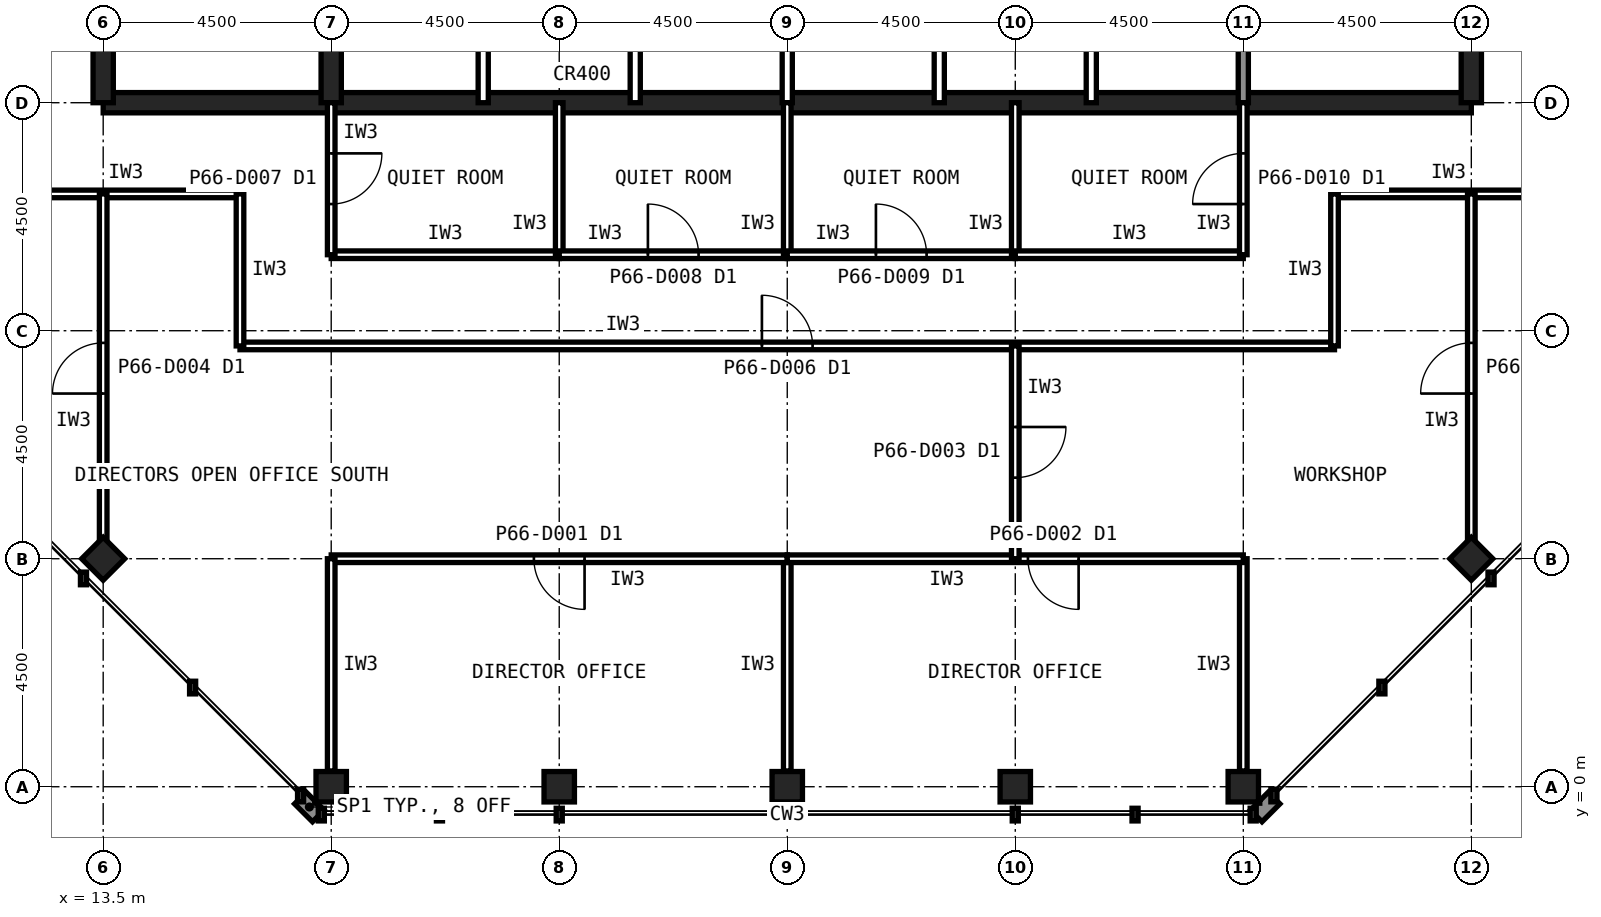
"""IFC4 building model, lengths in metres.
Left out: names, types, materials, properties, quantities, classifications, styles, units other than length and angle.
Written with IfcOpenShell. Run it as: python <this file> out.ifc"""

import sys

from ifc_helpers import new_model, si_unit, direction, frame, frame_2d, origin, origin_2d, place, context, subcontext, project, spatial, rectangle, hollow_rectangle, extrude, element, fill, save


model = new_model("IFC4")
c1 = context("Model", 3, precision=1e-05, world=origin(), true_north=direction((0.0, 1.0)))
c2 = subcontext(c1, "Body", "Model", "MODEL_VIEW")
j1 = project(units=[si_unit("LENGTHUNIT", "METRE"), si_unit("PLANEANGLEUNIT", "RADIAN")], contexts=[c1])
p1 = place(None, origin())
s1 = spatial("IfcSite", under=j1, at=p1, CompositionType="ELEMENT")
p2 = place(p1, origin())
s2 = spatial("IfcBuilding", under=s1, at=p2, CompositionType="ELEMENT")
p3 = place(p2, frame((0.0, 0.0, 278.6)))
s3 = spatial("IfcBuildingStorey", under=s2, at=p3, CompositionType="ELEMENT", Elevation=278.6)
for number, where, z_axis, x_axis in (
    (1, (18.0, 0.0, 0.0), (0.0, 0.0, 1.0), (1.0, 0.0, 0.0)),
    (2, (22.5, 0.0, 0.0), (0.0, 0.0, 1.0), (1.0, 0.0, 0.0)),
    (3, (27.0, 0.0, 0.0), (0.0, 0.0, 1.0), (1.0, 0.0, 0.0)),
    (4, (31.5, 0.0, 0.0), (0.0, 0.0, 1.0), (1.0, 0.0, 0.0)),
    (5, (36.0, 0.0, 0.0), (0.0, 0.0, 1.0), (1.0, 0.0, 0.0)),
    (6, (13.5, 4.5, 0.0), (0.0, 0.0, 1.0), (0.707, 0.707, 0.0)),
    (7, (40.5, 4.5, 0.0), (0.0, 0.0, 1.0), (0.707, 0.707, 0.0)),
):
    element("IfcColumn", number, at=place(p3, frame(where, z_axis=z_axis, x_axis=x_axis)), inside=s3, PredefinedType="COLUMN", context=c2, shape_type="SweptSolid", body=[
        extrude(hollow_rectangle(XDim=0.6, YDim=0.6, WallThickness=0.028, at=origin_2d()), origin(), (0.0, 0.0, 1.0), 4.0),
    ])
p4 = place(p3, frame((13.5, 13.5, 0.0), z_axis=(0.0, 0.0, 1.0), x_axis=(1.0, 0.0, 0.0)))
e8 = element("IfcWall", 8, at=p4, inside=s3, PredefinedType="SHEAR", context=c2, shape_type="SweptSolid", body=[
    extrude(rectangle(XDim=27.0, YDim=0.4, at=frame_2d((13.5, 0.0))), origin(), (0.0, 0.0, 1.0), 4.0),
])
p5 = place(p3, frame((40.5, 13.5, 0.0), z_axis=(0.0, 0.0, 1.0), x_axis=(0.0, 1.0, 0.0)))
e9 = element("IfcWall", 9, at=p5, inside=s3, PredefinedType="SHEAR", context=c2, shape_type="SweptSolid", body=[
    extrude(rectangle(XDim=27.0, YDim=0.4, at=frame_2d((13.5, 0.0))), origin(), (0.0, 0.0, 1.0), 4.0),
])
p6 = place(p5, frame((5.85, 0.0, 0.0)))
e10 = element("IfcOpeningElement", 10, at=p6, cuts=e9, PredefinedType="OPENING", context=c2, shape_type="SweptSolid", body=[
    extrude(rectangle(XDim=1.8, YDim=2.1, at=frame_2d((0.9, 1.05))), frame((0.0, 0.21, 0.0), z_axis=(0.0, -1.0, 0.0), x_axis=(1.0, 0.0, 0.0)), (0.0, 0.0, 1.0), 0.42),
])
p7 = place(p5, frame((19.65, 0.0, 0.0)))
e11 = element("IfcOpeningElement", 11, at=p7, cuts=e9, PredefinedType="OPENING", context=c2, shape_type="SweptSolid", body=[
    extrude(rectangle(XDim=1.2, YDim=2.1, at=frame_2d((0.6, 1.05))), frame((0.0, 0.21, 0.0), z_axis=(0.0, -1.0, 0.0), x_axis=(1.0, 0.0, 0.0)), (0.0, 0.0, 1.0), 0.42),
])
p8 = place(p3, frame((13.5, 40.5, 0.0), z_axis=(0.0, 0.0, 1.0), x_axis=(0.0, -1.0, 0.0)))
e12 = element("IfcWall", 12, at=p8, inside=s3, PredefinedType="SHEAR", context=c2, shape_type="SweptSolid", body=[
    extrude(rectangle(XDim=27.0, YDim=0.4, at=frame_2d((13.5, 0.0))), origin(), (0.0, 0.0, 1.0), 4.0),
])
p9 = place(p8, frame((19.65, 0.0, 0.0)))
e13 = element("IfcOpeningElement", 13, at=p9, cuts=e12, PredefinedType="OPENING", context=c2, shape_type="SweptSolid", body=[
    extrude(rectangle(XDim=1.2, YDim=2.1, at=frame_2d((0.6, 1.05))), frame((0.0, 0.21, 0.0), z_axis=(0.0, -1.0, 0.0), x_axis=(1.0, 0.0, 0.0)), (0.0, 0.0, 1.0), 0.42),
])
p10 = place(p8, frame((5.85, 0.0, 0.0)))
e14 = element("IfcOpeningElement", 14, at=p10, cuts=e12, PredefinedType="OPENING", context=c2, shape_type="SweptSolid", body=[
    extrude(rectangle(XDim=1.8, YDim=2.1, at=frame_2d((0.9, 1.05))), frame((0.0, 0.21, 0.0), z_axis=(0.0, -1.0, 0.0), x_axis=(1.0, 0.0, 0.0)), (0.0, 0.0, 1.0), 0.42),
])
p11 = place(p3, frame((18.0, 13.5, 0.0), z_axis=(0.0, 0.0, 1.0), x_axis=(0.0, 1.0, 0.0)))
e15 = element("IfcWall", 15, at=p11, inside=s3, PredefinedType="SHEAR", context=c2, shape_type="SweptSolid", body=[
    extrude(rectangle(XDim=18.0, YDim=0.4, at=frame_2d((9.0, 0.0))), origin(), (0.0, 0.0, 1.0), 4.0),
])
p12 = place(p3, frame((36.0, 13.5, 0.0), z_axis=(0.0, 0.0, 1.0), x_axis=(0.0, 1.0, 0.0)))
e16 = element("IfcWall", 16, at=p12, inside=s3, PredefinedType="SOLIDWALL", context=c2, shape_type="SweptSolid", body=[
    extrude(rectangle(XDim=4.5, YDim=0.2, at=frame_2d((2.25, 0.0))), origin(), (0.0, 0.0, 1.0), 3.84),
])
for number, where, z_axis, x_axis in (
    (17, (21.0, 13.5, 0.0), (0.0, 0.0, 1.0), (0.0, 1.0, 0.0)),
    (18, (24.0, 13.5, 0.0), (0.0, 0.0, 1.0), (0.0, 1.0, 0.0)),
    (19, (27.0, 13.5, 0.0), (0.0, 0.0, 1.0), (0.0, 1.0, 0.0)),
    (20, (30.0, 13.5, 0.0), (0.0, 0.0, 1.0), (0.0, 1.0, 0.0)),
    (21, (33.0, 13.5, 0.0), (0.0, 0.0, 1.0), (0.0, 1.0, 0.0)),
):
    element("IfcWall", number, at=place(p3, frame(where, z_axis=z_axis, x_axis=x_axis)), inside=s3, PredefinedType="PARTITIONING", context=c2, shape_type="SweptSolid", body=[
        extrude(rectangle(XDim=4.5, YDim=0.2, at=frame_2d((2.25, 0.0))), origin(), (0.0, 0.0, 1.0), 3.84),
    ])
p13 = place(p3, frame((16.2, 8.7, 0.0), z_axis=(0.0, 0.0, 1.0), x_axis=(1.0, 0.0, 0.0)))
e22 = element("IfcWall", 22, at=p13, inside=s3, PredefinedType="PARTITIONING", context=c2, shape_type="SweptSolid", body=[
    extrude(rectangle(XDim=21.6, YDim=0.15, at=frame_2d((10.8, 0.0))), origin(), (0.0, 0.0, 1.0), 3.84),
])
p14 = place(p13, frame((10.3, 0.0, 0.0)))
e23 = element("IfcOpeningElement", 23, at=p14, cuts=e22, PredefinedType="OPENING", context=c2, shape_type="SweptSolid", body=[
    extrude(rectangle(XDim=1.0, YDim=2.1, at=frame_2d((0.5, 1.05))), frame((0.0, 0.085, 0.0), z_axis=(0.0, -1.0, 0.0), x_axis=(1.0, 0.0, 0.0)), (0.0, 0.0, 1.0), 0.17),
])
for number, where, z_axis, x_axis in (
    (24, (11.7, 11.7, 0.0), (0.0, 0.0, 1.0), (1.0, 0.0, 0.0)),
    (25, (37.8, 11.7, 0.0), (0.0, 0.0, 1.0), (1.0, 0.0, 0.0)),
):
    element("IfcWall", number, at=place(p3, frame(where, z_axis=z_axis, x_axis=x_axis)), inside=s3, PredefinedType="PARTITIONING", context=c2, shape_type="SweptSolid", body=[
        extrude(rectangle(XDim=4.5, YDim=0.15, at=frame_2d((2.25, 0.0))), origin(), (0.0, 0.0, 1.0), 3.84),
    ])
for number, where, z_axis, x_axis in (
    (26, (16.2, 11.7, 0.0), (0.0, 0.0, 1.0), (0.0, -1.0, 0.0)),
    (27, (37.8, 8.7, 0.0), (0.0, 0.0, 1.0), (0.0, 1.0, 0.0)),
):
    element("IfcWall", number, at=place(p3, frame(where, z_axis=z_axis, x_axis=x_axis)), inside=s3, PredefinedType="PARTITIONING", context=c2, shape_type="SweptSolid", body=[
        extrude(rectangle(XDim=3.0, YDim=0.15, at=frame_2d((1.5, 0.0))), origin(), (0.0, 0.0, 1.0), 3.84),
    ])
p15 = place(p3, frame((27.0, 0.31, 0.0), z_axis=(0.0, 0.0, 1.0), x_axis=(0.0, 1.0, 0.0)))
e28 = element("IfcWall", 28, at=p15, inside=s3, PredefinedType="PARTITIONING", context=c2, shape_type="SweptSolid", body=[
    extrude(rectangle(XDim=4.19, YDim=0.15, at=frame_2d((2.095, 0.0))), origin(), (0.0, 0.0, 1.0), 2.989),
])
p16 = place(p3, frame((27.0, 4.5, 0.0), z_axis=(0.0, 0.0, 1.0), x_axis=(-1.0, 0.0, 0.0)))
e29 = element("IfcWall", 29, at=p16, inside=s3, PredefinedType="PARTITIONING", context=c2, shape_type="SweptSolid", body=[
    extrude(rectangle(XDim=9.0, YDim=0.15, at=frame_2d((4.5, 0.0))), origin(), (0.0, 0.0, 1.0), 3.84),
])
p17 = place(p16, frame((4.0, 0.0, 0.0)))
e30 = element("IfcOpeningElement", 30, at=p17, cuts=e29, PredefinedType="OPENING", context=c2, shape_type="SweptSolid", body=[
    extrude(rectangle(XDim=1.0, YDim=2.1, at=frame_2d((0.5, 1.05))), frame((0.0, 0.085, 0.0), z_axis=(0.0, -1.0, 0.0), x_axis=(1.0, 0.0, 0.0)), (0.0, 0.0, 1.0), 0.17),
])
for number, where, z_axis, x_axis in (
    (31, (18.0, 4.5, 0.0), (0.0, 0.0, 1.0), (0.0, -1.0, 0.0)),
    (32, (36.0, 0.31, 0.0), (0.0, 0.0, 1.0), (0.0, 1.0, 0.0)),
):
    element("IfcWall", number, at=place(p3, frame(where, z_axis=z_axis, x_axis=x_axis)), inside=s3, PredefinedType="PARTITIONING", context=c2, shape_type="SweptSolid", body=[
        extrude(rectangle(XDim=4.19, YDim=0.15, at=frame_2d((2.095, 0.0))), origin(), (0.0, 0.0, 1.0), 2.989),
    ])
p18 = place(p3, frame((36.0, 4.5, 0.0), z_axis=(0.0, 0.0, 1.0), x_axis=(-1.0, 0.0, 0.0)))
e33 = element("IfcWall", 33, at=p18, inside=s3, PredefinedType="PARTITIONING", context=c2, shape_type="SweptSolid", body=[
    extrude(rectangle(XDim=9.0, YDim=0.15, at=frame_2d((4.5, 0.0))), origin(), (0.0, 0.0, 1.0), 3.84),
])
p19 = place(p18, frame((3.25, 0.0, 0.0)))
e34 = element("IfcOpeningElement", 34, at=p19, cuts=e33, PredefinedType="OPENING", context=c2, shape_type="SweptSolid", body=[
    extrude(rectangle(XDim=1.0, YDim=2.1, at=frame_2d((0.5, 1.05))), frame((0.0, 0.085, 0.0), z_axis=(0.0, -1.0, 0.0), x_axis=(1.0, 0.0, 0.0)), (0.0, 0.0, 1.0), 0.17),
])
p20 = place(p3, frame((18.0, 10.5, 0.0), z_axis=(0.0, 0.0, 1.0), x_axis=(1.0, 0.0, 0.0)))
e35 = element("IfcWall", 35, at=p20, inside=s3, PredefinedType="PARTITIONING", context=c2, shape_type="SweptSolid", body=[
    extrude(rectangle(XDim=4.5, YDim=0.15, at=frame_2d((2.25, 0.0))), origin(), (0.0, 0.0, 1.0), 3.84),
])
p21 = place(p3, frame((22.5, 10.5, 0.0), z_axis=(0.0, 0.0, 1.0), x_axis=(0.0, 1.0, 0.0)))
e36 = element("IfcWall", 36, at=p21, inside=s3, PredefinedType="PARTITIONING", context=c2, shape_type="SweptSolid", body=[
    extrude(rectangle(XDim=3.0, YDim=0.15, at=frame_2d((1.5, 0.0))), origin(), (0.0, 0.0, 1.0), 2.989),
])
p22 = place(p3, frame((18.0, 13.5, 0.0), z_axis=(0.0, 0.0, 1.0), x_axis=(0.0, -1.0, 0.0)))
e37 = element("IfcWall", 37, at=p22, inside=s3, PredefinedType="PARTITIONING", context=c2, shape_type="SweptSolid", body=[
    extrude(rectangle(XDim=3.0, YDim=0.15, at=frame_2d((1.5, 0.0))), origin(), (0.0, 0.0, 1.0), 2.989),
])
p23 = place(p22, frame((1.0, 0.0, 0.0)))
e38 = element("IfcOpeningElement", 38, at=p23, cuts=e37, PredefinedType="OPENING", context=c2, shape_type="SweptSolid", body=[
    extrude(rectangle(XDim=1.0, YDim=2.1, at=frame_2d((0.5, 1.05))), frame((0.0, 0.085, 0.0), z_axis=(0.0, -1.0, 0.0), x_axis=(1.0, 0.0, 0.0)), (0.0, 0.0, 1.0), 0.17),
])
p24 = place(p3, frame((22.5, 10.5, 0.0), z_axis=(0.0, 0.0, 1.0), x_axis=(1.0, 0.0, 0.0)))
e39 = element("IfcWall", 39, at=p24, inside=s3, PredefinedType="PARTITIONING", context=c2, shape_type="SweptSolid", body=[
    extrude(rectangle(XDim=4.5, YDim=0.15, at=frame_2d((2.25, 0.0))), origin(), (0.0, 0.0, 1.0), 3.84),
])
p25 = place(p24, frame((1.75, 0.0, 0.0)))
e40 = element("IfcOpeningElement", 40, at=p25, cuts=e39, PredefinedType="OPENING", context=c2, shape_type="SweptSolid", body=[
    extrude(rectangle(XDim=1.0, YDim=2.1, at=frame_2d((0.5, 1.05))), frame((0.0, 0.085, 0.0), z_axis=(0.0, -1.0, 0.0), x_axis=(1.0, 0.0, 0.0)), (0.0, 0.0, 1.0), 0.17),
])
p26 = place(p3, frame((27.0, 10.5, 0.0), z_axis=(0.0, 0.0, 1.0), x_axis=(0.0, 1.0, 0.0)))
e41 = element("IfcWall", 41, at=p26, inside=s3, PredefinedType="PARTITIONING", context=c2, shape_type="SweptSolid", body=[
    extrude(rectangle(XDim=3.0, YDim=0.15, at=frame_2d((1.5, 0.0))), origin(), (0.0, 0.0, 1.0), 2.989),
])
p27 = place(p3, frame((27.0, 10.5, 0.0), z_axis=(0.0, 0.0, 1.0), x_axis=(1.0, 0.0, 0.0)))
e42 = element("IfcWall", 42, at=p27, inside=s3, PredefinedType="PARTITIONING", context=c2, shape_type="SweptSolid", body=[
    extrude(rectangle(XDim=4.5, YDim=0.15, at=frame_2d((2.25, 0.0))), origin(), (0.0, 0.0, 1.0), 3.84),
])
p28 = place(p27, frame((1.75, 0.0, 0.0)))
e43 = element("IfcOpeningElement", 43, at=p28, cuts=e42, PredefinedType="OPENING", context=c2, shape_type="SweptSolid", body=[
    extrude(rectangle(XDim=1.0, YDim=2.1, at=frame_2d((0.5, 1.05))), frame((0.0, 0.085, 0.0), z_axis=(0.0, -1.0, 0.0), x_axis=(1.0, 0.0, 0.0)), (0.0, 0.0, 1.0), 0.17),
])
p29 = place(p3, frame((31.5, 10.5, 0.0), z_axis=(0.0, 0.0, 1.0), x_axis=(0.0, 1.0, 0.0)))
e44 = element("IfcWall", 44, at=p29, inside=s3, PredefinedType="PARTITIONING", context=c2, shape_type="SweptSolid", body=[
    extrude(rectangle(XDim=3.0, YDim=0.15, at=frame_2d((1.5, 0.0))), origin(), (0.0, 0.0, 1.0), 2.989),
])
p30 = place(p3, frame((31.5, 10.5, 0.0), z_axis=(0.0, 0.0, 1.0), x_axis=(1.0, 0.0, 0.0)))
e45 = element("IfcWall", 45, at=p30, inside=s3, PredefinedType="PARTITIONING", context=c2, shape_type="SweptSolid", body=[
    extrude(rectangle(XDim=4.5, YDim=0.15, at=frame_2d((2.25, 0.0))), origin(), (0.0, 0.0, 1.0), 3.84),
])
p31 = place(p3, frame((36.0, 10.5, 0.0), z_axis=(0.0, 0.0, 1.0), x_axis=(0.0, 1.0, 0.0)))
e46 = element("IfcWall", 46, at=p31, inside=s3, PredefinedType="PARTITIONING", context=c2, shape_type="SweptSolid", body=[
    extrude(rectangle(XDim=3.0, YDim=0.15, at=frame_2d((1.5, 0.0))), origin(), (0.0, 0.0, 1.0), 2.989),
])
p32 = place(p31, frame((1.0, 0.0, 0.0)))
e47 = element("IfcOpeningElement", 47, at=p32, cuts=e46, PredefinedType="OPENING", context=c2, shape_type="SweptSolid", body=[
    extrude(rectangle(XDim=1.0, YDim=2.1, at=frame_2d((0.5, 1.05))), frame((0.0, 0.085, 0.0), z_axis=(0.0, -1.0, 0.0), x_axis=(1.0, 0.0, 0.0)), (0.0, 0.0, 1.0), 0.17),
])
p33 = place(p3, frame((40.5, 4.82, 0.0), z_axis=(0.0, 0.0, 1.0), x_axis=(0.0, 1.0, 0.0)))
e48 = element("IfcWall", 48, at=p33, inside=s3, PredefinedType="PARTITIONING", context=c2, shape_type="SweptSolid", body=[
    extrude(rectangle(XDim=6.88, YDim=0.15, at=frame_2d((3.44, 0.0))), origin(), (0.0, 0.0, 1.0), 2.989),
])
p34 = place(p33, frame((2.94, 0.0, 0.0)))
e49 = element("IfcOpeningElement", 49, at=p34, cuts=e48, PredefinedType="OPENING", context=c2, shape_type="SweptSolid", body=[
    extrude(rectangle(XDim=1.0, YDim=2.1, at=frame_2d((0.5, 1.05))), frame((0.0, 0.085, 0.0), z_axis=(0.0, -1.0, 0.0), x_axis=(1.0, 0.0, 0.0)), (0.0, 0.0, 1.0), 0.17),
])
p35 = place(p3, frame((13.5, 4.82, 0.0), z_axis=(0.0, 0.0, 1.0), x_axis=(0.0, 1.0, 0.0)))
e50 = element("IfcWall", 50, at=p35, inside=s3, PredefinedType="PARTITIONING", context=c2, shape_type="SweptSolid", body=[
    extrude(rectangle(XDim=6.88, YDim=0.15, at=frame_2d((3.44, 0.0))), origin(), (0.0, 0.0, 1.0), 2.989),
])
p36 = place(p35, frame((2.94, 0.0, 0.0)))
e51 = element("IfcOpeningElement", 51, at=p36, cuts=e50, PredefinedType="OPENING", context=c2, shape_type="SweptSolid", body=[
    extrude(rectangle(XDim=1.0, YDim=2.1, at=frame_2d((0.5, 1.05))), frame((0.0, 0.085, 0.0), z_axis=(0.0, -1.0, 0.0), x_axis=(1.0, 0.0, 0.0)), (0.0, 0.0, 1.0), 0.17),
])
p37 = place(p3, frame((31.5, 8.7, 0.0), z_axis=(0.0, 0.0, 1.0), x_axis=(0.0, -1.0, 0.0)))
e52 = element("IfcWall", 52, at=p37, inside=s3, PredefinedType="PARTITIONING", context=c2, shape_type="SweptSolid", body=[
    extrude(rectangle(XDim=4.2, YDim=0.15, at=frame_2d((2.1, 0.0))), origin(), (0.0, 0.0, 1.0), 2.989),
])
p38 = place(p37, frame((1.6, 0.0, 0.0)))
e53 = element("IfcOpeningElement", 53, at=p38, cuts=e52, PredefinedType="OPENING", context=c2, shape_type="SweptSolid", body=[
    extrude(rectangle(XDim=1.0, YDim=2.1, at=frame_2d((0.5, 1.05))), frame((0.0, 0.085, 0.0), z_axis=(0.0, -1.0, 0.0), x_axis=(1.0, 0.0, 0.0)), (0.0, 0.0, 1.0), 0.17),
])
p39 = place(p14, origin())
e54 = element("IfcDoor", 54, at=p39, inside=s3, OperationType="SINGLE_SWING_LEFT", PredefinedType="DOOR", context=c2, shape_type="SweptSolid", body=[
    extrude(rectangle(XDim=1.0, YDim=2.1, at=frame_2d((0.5, 1.05))), frame((0.0, 0.025, 0.0), z_axis=(0.0, -1.0, 0.0), x_axis=(1.0, 0.0, 0.0)), (0.0, 0.0, 1.0), 0.05),
])
fill(e23, e54)
p40 = place(p17, origin())
e55 = element("IfcDoor", 55, at=p40, inside=s3, OperationType="SINGLE_SWING_LEFT", PredefinedType="DOOR", context=c2, shape_type="SweptSolid", body=[
    extrude(rectangle(XDim=1.0, YDim=2.1, at=frame_2d((0.5, 1.05))), frame((0.0, 0.025, 0.0), z_axis=(0.0, -1.0, 0.0), x_axis=(1.0, 0.0, 0.0)), (0.0, 0.0, 1.0), 0.05),
])
fill(e30, e55)
p41 = place(p19, origin())
e56 = element("IfcDoor", 56, at=p41, inside=s3, OperationType="SINGLE_SWING_LEFT", PredefinedType="DOOR", context=c2, shape_type="SweptSolid", body=[
    extrude(rectangle(XDim=1.0, YDim=2.1, at=frame_2d((0.5, 1.05))), frame((0.0, 0.025, 0.0), z_axis=(0.0, -1.0, 0.0), x_axis=(1.0, 0.0, 0.0)), (0.0, 0.0, 1.0), 0.05),
])
fill(e34, e56)
p42 = place(p23, origin())
e57 = element("IfcDoor", 57, at=p42, inside=s3, OperationType="SINGLE_SWING_LEFT", PredefinedType="DOOR", context=c2, shape_type="SweptSolid", body=[
    extrude(rectangle(XDim=1.0, YDim=2.1, at=frame_2d((0.5, 1.05))), frame((0.0, 0.025, 0.0), z_axis=(0.0, -1.0, 0.0), x_axis=(1.0, 0.0, 0.0)), (0.0, 0.0, 1.0), 0.05),
])
fill(e38, e57)
p43 = place(p25, origin())
e58 = element("IfcDoor", 58, at=p43, inside=s3, OperationType="SINGLE_SWING_LEFT", PredefinedType="DOOR", context=c2, shape_type="SweptSolid", body=[
    extrude(rectangle(XDim=1.0, YDim=2.1, at=frame_2d((0.5, 1.05))), frame((0.0, 0.025, 0.0), z_axis=(0.0, -1.0, 0.0), x_axis=(1.0, 0.0, 0.0)), (0.0, 0.0, 1.0), 0.05),
])
fill(e40, e58)
p44 = place(p28, origin())
e59 = element("IfcDoor", 59, at=p44, inside=s3, OperationType="SINGLE_SWING_LEFT", PredefinedType="DOOR", context=c2, shape_type="SweptSolid", body=[
    extrude(rectangle(XDim=1.0, YDim=2.1, at=frame_2d((0.5, 1.05))), frame((0.0, 0.025, 0.0), z_axis=(0.0, -1.0, 0.0), x_axis=(1.0, 0.0, 0.0)), (0.0, 0.0, 1.0), 0.05),
])
fill(e43, e59)
p45 = place(p32, origin())
e60 = element("IfcDoor", 60, at=p45, inside=s3, OperationType="SINGLE_SWING_LEFT", PredefinedType="DOOR", context=c2, shape_type="SweptSolid", body=[
    extrude(rectangle(XDim=1.0, YDim=2.1, at=frame_2d((0.5, 1.05))), frame((0.0, 0.025, 0.0), z_axis=(0.0, -1.0, 0.0), x_axis=(1.0, 0.0, 0.0)), (0.0, 0.0, 1.0), 0.05),
])
fill(e47, e60)
p46 = place(p34, origin())
e61 = element("IfcDoor", 61, at=p46, inside=s3, OperationType="SINGLE_SWING_LEFT", PredefinedType="DOOR", context=c2, shape_type="SweptSolid", body=[
    extrude(rectangle(XDim=1.0, YDim=2.1, at=frame_2d((0.5, 1.05))), frame((0.0, 0.025, 0.0), z_axis=(0.0, -1.0, 0.0), x_axis=(1.0, 0.0, 0.0)), (0.0, 0.0, 1.0), 0.05),
])
fill(e49, e61)
p47 = place(p36, origin())
e62 = element("IfcDoor", 62, at=p47, inside=s3, OperationType="SINGLE_SWING_LEFT", PredefinedType="DOOR", context=c2, shape_type="SweptSolid", body=[
    extrude(rectangle(XDim=1.0, YDim=2.1, at=frame_2d((0.5, 1.05))), frame((0.0, 0.025, 0.0), z_axis=(0.0, -1.0, 0.0), x_axis=(1.0, 0.0, 0.0)), (0.0, 0.0, 1.0), 0.05),
])
fill(e51, e62)
p48 = place(p38, origin())
e63 = element("IfcDoor", 63, at=p48, inside=s3, OperationType="SINGLE_SWING_LEFT", PredefinedType="DOOR", context=c2, shape_type="SweptSolid", body=[
    extrude(rectangle(XDim=1.0, YDim=2.1, at=frame_2d((0.5, 1.05))), frame((0.0, 0.025, 0.0), z_axis=(0.0, -1.0, 0.0), x_axis=(1.0, 0.0, 0.0)), (0.0, 0.0, 1.0), 0.05),
])
fill(e53, e63)
save(model, sys.argv[1])
